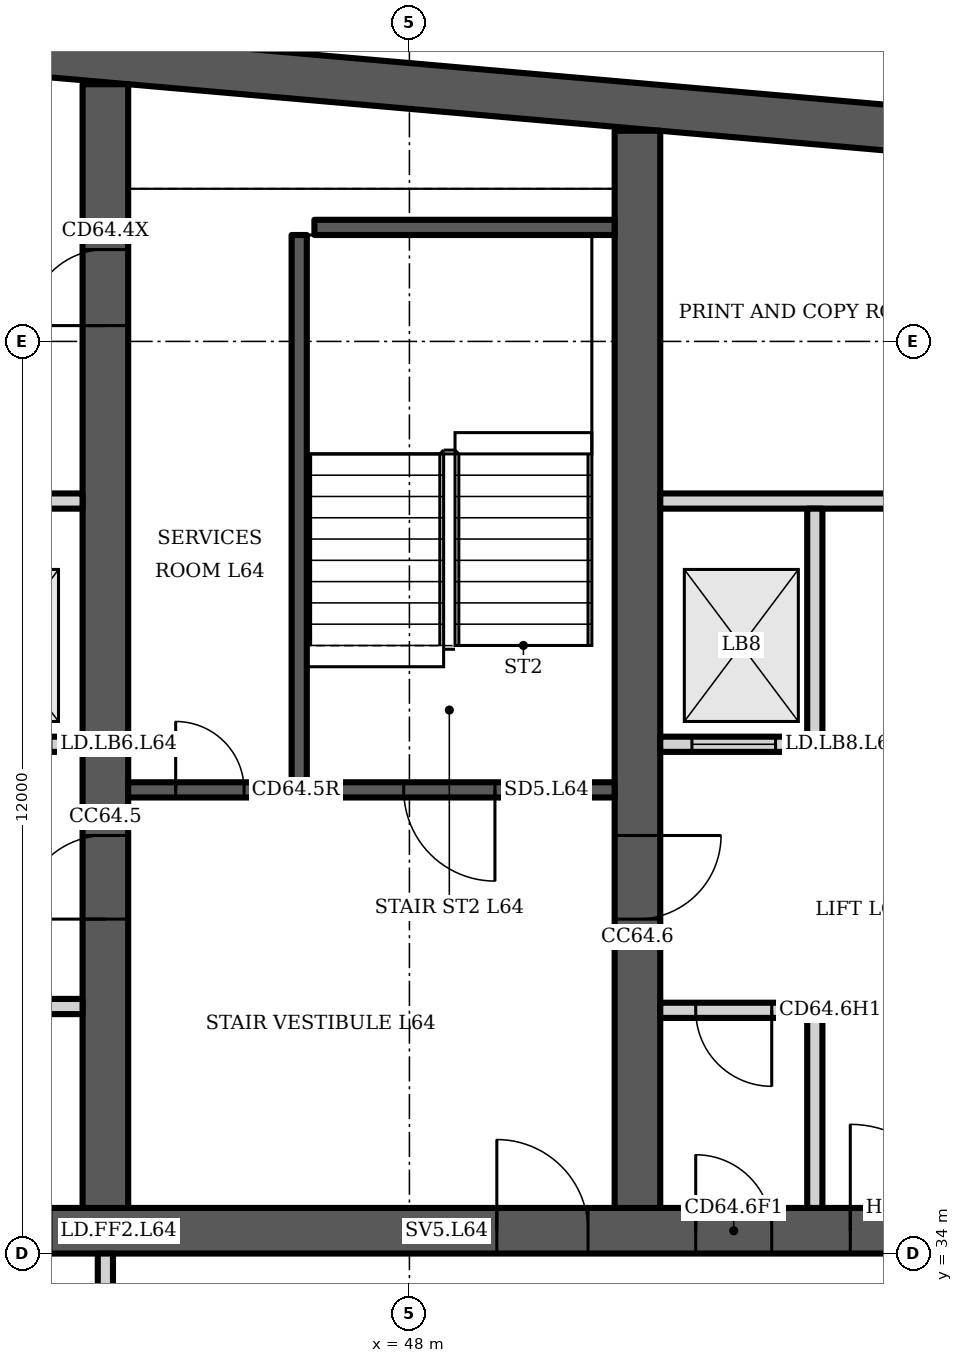
"""IFC4 building model, lengths in metres.
Left out: names, types, materials, properties, quantities, classifications, styles, units other than length and angle.
Written with IfcOpenShell. Run it as: python <this file> out.ifc"""

import sys

from ifc_helpers import new_model, si_unit, direction, frame, frame_2d, origin, place, context, subcontext, project, spatial, polyline, rectangle, outline, extrude, element, fill, save


model = new_model("IFC4")
c1 = context("Model", 3, precision=1e-05, world=origin(), true_north=direction((0.0, 1.0)))
c2 = subcontext(c1, "Body", "Model", "MODEL_VIEW")
j1 = project(units=[si_unit("LENGTHUNIT", "METRE"), si_unit("PLANEANGLEUNIT", "RADIAN")], contexts=[c1])
p1 = place(None, origin())
s1 = spatial("IfcSite", under=j1, at=p1, CompositionType="ELEMENT")
p2 = place(p1, origin())
s2 = spatial("IfcBuilding", under=s1, at=p2, CompositionType="ELEMENT")
p3 = place(p2, frame((0.0, 0.0, 253.9)))
s3 = spatial("IfcBuildingStorey", under=s2, at=p3, CompositionType="ELEMENT", Elevation=253.9)
p4 = place(p3, origin())
e1 = element("IfcWall", 1, at=p4, inside=s3, PredefinedType="SHEAR", context=c2, shape_type="SweptSolid", body=[
    extrude(outline(polyline([(23.0, 48.185), (40.5, 49.716), (58.0, 48.185), (58.0, 48.787), (40.5, 50.318), (23.0, 48.787), (23.0, 48.185)])), origin(), (0.0, 0.0, 1.0), 3.6),
])
p5 = place(p3, frame((23.0, 34.3, 0.0), z_axis=(0.0, 0.0, 1.0), x_axis=(1.0, 0.0, 0.0)))
e2 = element("IfcWall", 2, at=p5, inside=s3, PredefinedType="SHEAR", context=c2, shape_type="SweptSolid", body=[
    extrude(rectangle(XDim=35.0, YDim=0.6, at=frame_2d((17.5, 0.0))), origin(), (0.0, 0.0, 1.0), 3.6),
])
p6 = place(p5, frame((0.65, 0.0, 0.0)))
e3 = element("IfcOpeningElement", 3, at=p6, cuts=e2, PredefinedType="OPENING", context=c2, shape_type="SweptSolid", body=[
    extrude(rectangle(XDim=1.2, YDim=2.1, at=frame_2d((0.6, 1.05))), frame((0.0, 0.31, 0.0), z_axis=(0.0, -1.0, 0.0), x_axis=(1.0, 0.0, 0.0)), (0.0, 0.0, 1.0), 0.62),
])
p7 = place(p5, frame((7.717, 0.0, 0.0)))
e4 = element("IfcOpeningElement", 4, at=p7, cuts=e2, PredefinedType="OPENING", context=c2, shape_type="SweptSolid", body=[
    extrude(rectangle(XDim=1.1, YDim=2.1, at=frame_2d((0.55, 1.05))), frame((0.0, 0.31, 0.0), z_axis=(0.0, -1.0, 0.0), x_axis=(1.0, 0.0, 0.0)), (0.0, 0.0, 1.0), 0.62),
])
p8 = place(p5, frame((12.183, 0.0, 0.0)))
e5 = element("IfcOpeningElement", 5, at=p8, cuts=e2, PredefinedType="OPENING", context=c2, shape_type="SweptSolid", body=[
    extrude(rectangle(XDim=1.1, YDim=2.1, at=frame_2d((0.55, 1.05))), frame((0.0, 0.31, 0.0), z_axis=(0.0, -1.0, 0.0), x_axis=(1.0, 0.0, 0.0)), (0.0, 0.0, 1.0), 0.62),
])
p9 = place(p5, frame((9.8, 0.0, 0.0)))
e6 = element("IfcOpeningElement", 6, at=p9, cuts=e2, PredefinedType="OPENING", context=c2, shape_type="SweptSolid", body=[
    extrude(rectangle(XDim=1.4, YDim=2.1, at=frame_2d((0.7, 1.05))), frame((0.0, 0.31, 0.0), z_axis=(0.0, -1.0, 0.0), x_axis=(1.0, 0.0, 0.0)), (0.0, 0.0, 1.0), 0.62),
])
p10 = place(p5, frame((14.717, 0.0, 0.0)))
e7 = element("IfcOpeningElement", 7, at=p10, cuts=e2, PredefinedType="OPENING", context=c2, shape_type="SweptSolid", body=[
    extrude(rectangle(XDim=1.1, YDim=2.1, at=frame_2d((0.55, 1.05))), frame((0.0, 0.31, 0.0), z_axis=(0.0, -1.0, 0.0), x_axis=(1.0, 0.0, 0.0)), (0.0, 0.0, 1.0), 0.62),
])
p11 = place(p5, frame((16.95, 0.0, 0.0)))
e8 = element("IfcOpeningElement", 8, at=p11, cuts=e2, PredefinedType="OPENING", context=c2, shape_type="SweptSolid", body=[
    extrude(rectangle(XDim=1.1, YDim=2.1, at=frame_2d((0.55, 1.05))), frame((0.0, 0.31, 0.0), z_axis=(0.0, -1.0, 0.0), x_axis=(1.0, 0.0, 0.0)), (0.0, 0.0, 1.0), 0.62),
])
p12 = place(p5, frame((19.183, 0.0, 0.0)))
e9 = element("IfcOpeningElement", 9, at=p12, cuts=e2, PredefinedType="OPENING", context=c2, shape_type="SweptSolid", body=[
    extrude(rectangle(XDim=1.1, YDim=2.1, at=frame_2d((0.55, 1.05))), frame((0.0, 0.31, 0.0), z_axis=(0.0, -1.0, 0.0), x_axis=(1.0, 0.0, 0.0)), (0.0, 0.0, 1.0), 0.62),
])
p13 = place(p5, frame((26.15, 0.0, 0.0)))
e10 = element("IfcOpeningElement", 10, at=p13, cuts=e2, PredefinedType="OPENING", context=c2, shape_type="SweptSolid", body=[
    extrude(rectangle(XDim=1.2, YDim=2.1, at=frame_2d((0.6, 1.05))), frame((0.0, 0.31, 0.0), z_axis=(0.0, -1.0, 0.0), x_axis=(1.0, 0.0, 0.0)), (0.0, 0.0, 1.0), 0.62),
])
p14 = place(p5, frame((28.767, 0.0, 0.0)))
e11 = element("IfcOpeningElement", 11, at=p14, cuts=e2, PredefinedType="OPENING", context=c2, shape_type="SweptSolid", body=[
    extrude(rectangle(XDim=1.0, YDim=2.1, at=frame_2d((0.5, 1.05))), frame((0.0, 0.31, 0.0), z_axis=(0.0, -1.0, 0.0), x_axis=(1.0, 0.0, 0.0)), (0.0, 0.0, 1.0), 0.62),
])
p15 = place(p5, frame((33.083, 0.0, 0.0)))
e12 = element("IfcOpeningElement", 12, at=p15, cuts=e2, PredefinedType="OPENING", context=c2, shape_type="SweptSolid", body=[
    extrude(rectangle(XDim=1.0, YDim=2.1, at=frame_2d((0.5, 1.05))), frame((0.0, 0.31, 0.0), z_axis=(0.0, -1.0, 0.0), x_axis=(1.0, 0.0, 0.0)), (0.0, 0.0, 1.0), 0.62),
])
p16 = place(p5, frame((30.8, 0.0, 0.0)))
e13 = element("IfcOpeningElement", 13, at=p16, cuts=e2, PredefinedType="OPENING", context=c2, shape_type="SweptSolid", body=[
    extrude(rectangle(XDim=1.4, YDim=2.1, at=frame_2d((0.7, 1.05))), frame((0.0, 0.31, 0.0), z_axis=(0.0, -1.0, 0.0), x_axis=(1.0, 0.0, 0.0)), (0.0, 0.0, 1.0), 0.62),
])
p17 = place(p3, frame((44.0, 34.6, 0.0), z_axis=(0.0, 0.0, 1.0), x_axis=(0.0, 1.0, 0.0)))
e14 = element("IfcWall", 14, at=p17, inside=s3, PredefinedType="SHEAR", context=c2, shape_type="SweptSolid", body=[
    extrude(rectangle(XDim=14.784, YDim=0.6, at=frame_2d((7.392, 0.0))), origin(), (0.0, 0.0, 1.0), 3.6),
])
p18 = place(p17, frame((11.608, 0.0, 0.0)))
e15 = element("IfcOpeningElement", 15, at=p18, cuts=e14, PredefinedType="OPENING", context=c2, shape_type="SweptSolid", body=[
    extrude(rectangle(XDim=1.0, YDim=2.1, at=frame_2d((0.5, 1.05))), frame((0.0, 0.31, 0.0), z_axis=(0.0, -1.0, 0.0), x_axis=(1.0, 0.0, 0.0)), (0.0, 0.0, 1.0), 0.62),
])
p19 = place(p17, frame((3.8, 0.0, 0.0)))
e16 = element("IfcOpeningElement", 16, at=p19, cuts=e14, PredefinedType="OPENING", context=c2, shape_type="SweptSolid", body=[
    extrude(rectangle(XDim=1.1, YDim=2.1, at=frame_2d((0.55, 1.05))), frame((0.0, 0.31, 0.0), z_axis=(0.0, -1.0, 0.0), x_axis=(1.0, 0.0, 0.0)), (0.0, 0.0, 1.0), 0.62),
])
p20 = place(p3, frame((51.0, 34.6, 0.0), z_axis=(0.0, 0.0, 1.0), x_axis=(0.0, 1.0, 0.0)))
e17 = element("IfcWall", 17, at=p20, inside=s3, PredefinedType="SHEAR", context=c2, shape_type="SweptSolid", body=[
    extrude(rectangle(XDim=14.171, YDim=0.6, at=frame_2d((7.085, 0.0))), origin(), (0.0, 0.0, 1.0), 3.6),
])
p21 = place(p20, frame((3.8, 0.0, 0.0)))
e18 = element("IfcOpeningElement", 18, at=p21, cuts=e17, PredefinedType="OPENING", context=c2, shape_type="SweptSolid", body=[
    extrude(rectangle(XDim=1.1, YDim=2.1, at=frame_2d((0.55, 1.05))), frame((0.0, 0.31, 0.0), z_axis=(0.0, -1.0, 0.0), x_axis=(1.0, 0.0, 0.0)), (0.0, 0.0, 1.0), 0.62),
])
p22 = place(p3, frame((37.3, 40.7, 0.0), z_axis=(0.0, 0.0, 1.0), x_axis=(1.0, 0.0, 0.0)))
e19 = element("IfcWall", 19, at=p22, inside=s3, PredefinedType="PARTITIONING", context=c2, shape_type="SweptSolid", body=[
    extrude(rectangle(XDim=6.4, YDim=0.2, at=frame_2d((3.2, 0.0))), origin(), (0.0, 0.0, 1.0), 3.2),
])
p23 = place(p22, frame((0.417, 0.0, 0.0)))
e20 = element("IfcOpeningElement", 20, at=p23, cuts=e19, PredefinedType="OPENING", context=c2, shape_type="SweptSolid", body=[
    extrude(rectangle(XDim=1.1, YDim=2.1, at=frame_2d((0.55, 1.05))), frame((0.0, 0.11, 0.0), z_axis=(0.0, -1.0, 0.0), x_axis=(1.0, 0.0, 0.0)), (0.0, 0.0, 1.0), 0.22),
])
p24 = place(p22, frame((2.65, 0.0, 0.0)))
e21 = element("IfcOpeningElement", 21, at=p24, cuts=e19, PredefinedType="OPENING", context=c2, shape_type="SweptSolid", body=[
    extrude(rectangle(XDim=1.1, YDim=2.1, at=frame_2d((0.55, 1.05))), frame((0.0, 0.11, 0.0), z_axis=(0.0, -1.0, 0.0), x_axis=(1.0, 0.0, 0.0)), (0.0, 0.0, 1.0), 0.22),
])
p25 = place(p22, frame((4.883, 0.0, 0.0)))
e22 = element("IfcOpeningElement", 22, at=p25, cuts=e19, PredefinedType="OPENING", context=c2, shape_type="SweptSolid", body=[
    extrude(rectangle(XDim=1.1, YDim=2.1, at=frame_2d((0.55, 1.05))), frame((0.0, 0.11, 0.0), z_axis=(0.0, -1.0, 0.0), x_axis=(1.0, 0.0, 0.0)), (0.0, 0.0, 1.0), 0.22),
])
p26 = place(p3, origin())
e23 = element("IfcWall", 23, at=p26, inside=s3, PredefinedType="PARTITIONING", context=c2, shape_type="SweptSolid", body=[
    extrude(outline(polyline([(41.567, 37.1), (39.433, 37.1), (39.433, 34.6), (39.233, 34.6), (39.233, 37.45), (37.3, 37.45), (37.3, 37.65), (39.233, 37.65), (39.433, 37.65), (39.433, 37.3), (41.567, 37.3), (41.567, 37.35), (41.767, 37.35), (43.7, 37.35), (43.7, 37.15), (41.767, 37.15), (41.767, 34.6), (41.567, 34.6), (41.567, 37.1)])), origin(), (0.0, 0.0, 1.0), 3.2),
])
p27 = place(p3, origin())
e24 = element("IfcWall", 24, at=p27, inside=s3, PredefinedType="PARTITIONING", context=c2, shape_type="SweptSolid", body=[
    extrude(outline(polyline([(39.433, 40.8), (39.233, 40.8), (39.233, 43.8), (37.3, 43.8), (37.3, 44.0), (43.7, 44.0), (43.7, 43.8), (41.767, 43.8), (41.767, 40.8), (41.567, 40.8), (41.567, 43.8), (39.433, 43.8), (39.433, 40.8)])), origin(), (0.0, 0.0, 1.0), 3.2),
])
p28 = place(p3, frame((44.3, 40.1, 0.0), z_axis=(0.0, 0.0, 1.0), x_axis=(1.0, 0.0, 0.0)))
e25 = element("IfcWall", 25, at=p28, inside=s3, PredefinedType="SHEAR", context=c2, shape_type="SweptSolid", body=[
    extrude(rectangle(XDim=6.4, YDim=0.2, at=frame_2d((3.2, 0.0))), origin(), (0.0, 0.0, 1.0), 3.2),
])
p29 = place(p28, frame((3.625, 0.0, 0.0)))
e26 = element("IfcOpeningElement", 26, at=p29, cuts=e25, PredefinedType="OPENING", context=c2, shape_type="SweptSolid", body=[
    extrude(rectangle(XDim=1.2, YDim=2.1, at=frame_2d((0.6, 1.05))), frame((0.0, 0.11, 0.0), z_axis=(0.0, -1.0, 0.0), x_axis=(1.0, 0.0, 0.0)), (0.0, 0.0, 1.0), 0.22),
])
p30 = place(p28, frame((0.625, 0.0, 0.0)))
e27 = element("IfcOpeningElement", 27, at=p30, cuts=e25, PredefinedType="OPENING", context=c2, shape_type="SweptSolid", body=[
    extrude(rectangle(XDim=0.9, YDim=2.1, at=frame_2d((0.45, 1.05))), frame((0.0, 0.11, 0.0), z_axis=(0.0, -1.0, 0.0), x_axis=(1.0, 0.0, 0.0)), (0.0, 0.0, 1.0), 0.22),
])
p31 = place(p3, frame((46.55, 40.2, 0.0), z_axis=(0.0, 0.0, 1.0), x_axis=(0.0, 1.0, 0.0)))
e28 = element("IfcWall", 28, at=p31, inside=s3, PredefinedType="SHEAR", context=c2, shape_type="SweptSolid", body=[
    extrude(rectangle(XDim=7.2, YDim=0.2, at=frame_2d((3.6, 0.0))), origin(), (0.0, 0.0, 1.0), 3.2),
])
p32 = place(p3, frame((46.75, 47.5, 0.0), z_axis=(0.0, 0.0, 1.0), x_axis=(1.0, 0.0, 0.0)))
e29 = element("IfcWall", 29, at=p32, inside=s3, PredefinedType="SHEAR", context=c2, shape_type="SweptSolid", body=[
    extrude(rectangle(XDim=3.95, YDim=0.2, at=frame_2d((1.975, 0.0))), origin(), (0.0, 0.0, 1.0), 3.2),
])
p33 = place(p3, frame((51.3, 37.2, 0.0), z_axis=(0.0, 0.0, 1.0), x_axis=(1.0, 0.0, 0.0)))
e30 = element("IfcWall", 30, at=p33, inside=s3, PredefinedType="PARTITIONING", context=c2, shape_type="SweptSolid", body=[
    extrude(rectangle(XDim=1.933, YDim=0.2, at=frame_2d((0.967, 0.0))), origin(), (0.0, 0.0, 1.0), 3.2),
])
p34 = place(p33, frame((0.467, 0.0, 0.0)))
e31 = element("IfcOpeningElement", 31, at=p34, cuts=e30, PredefinedType="OPENING", context=c2, shape_type="SweptSolid", body=[
    extrude(rectangle(XDim=1.0, YDim=2.1, at=frame_2d((0.5, 1.05))), frame((0.0, 0.11, 0.0), z_axis=(0.0, -1.0, 0.0), x_axis=(1.0, 0.0, 0.0)), (0.0, 0.0, 1.0), 0.22),
])
p35 = place(p3, frame((51.3, 40.7, 0.0), z_axis=(0.0, 0.0, 1.0), x_axis=(1.0, 0.0, 0.0)))
e32 = element("IfcWall", 32, at=p35, inside=s3, PredefinedType="PARTITIONING", context=c2, shape_type="SweptSolid", body=[
    extrude(rectangle(XDim=6.1, YDim=0.2, at=frame_2d((3.05, 0.0))), origin(), (0.0, 0.0, 1.0), 3.2),
])
p36 = place(p35, frame((0.417, 0.0, 0.0)))
e33 = element("IfcOpeningElement", 33, at=p36, cuts=e32, PredefinedType="OPENING", context=c2, shape_type="SweptSolid", body=[
    extrude(rectangle(XDim=1.1, YDim=2.1, at=frame_2d((0.55, 1.05))), frame((0.0, 0.11, 0.0), z_axis=(0.0, -1.0, 0.0), x_axis=(1.0, 0.0, 0.0)), (0.0, 0.0, 1.0), 0.22),
])
p37 = place(p35, frame((3.617, 0.0, 0.0)))
e34 = element("IfcOpeningElement", 34, at=p37, cuts=e32, PredefinedType="OPENING", context=c2, shape_type="SweptSolid", body=[
    extrude(rectangle(XDim=1.0, YDim=2.1, at=frame_2d((0.5, 1.05))), frame((0.0, 0.11, 0.0), z_axis=(0.0, -1.0, 0.0), x_axis=(1.0, 0.0, 0.0)), (0.0, 0.0, 1.0), 0.22),
])
p38 = place(p3, frame((51.3, 43.9, 0.0), z_axis=(0.0, 0.0, 1.0), x_axis=(1.0, 0.0, 0.0)))
e35 = element("IfcWall", 35, at=p38, inside=s3, PredefinedType="PARTITIONING", context=c2, shape_type="SweptSolid", body=[
    extrude(rectangle(XDim=6.1, YDim=0.2, at=frame_2d((3.05, 0.0))), origin(), (0.0, 0.0, 1.0), 3.2),
])
p39 = place(p38, frame((3.617, 0.0, 0.0)))
e36 = element("IfcOpeningElement", 36, at=p39, cuts=e35, PredefinedType="OPENING", context=c2, shape_type="SweptSolid", body=[
    extrude(rectangle(XDim=1.0, YDim=2.1, at=frame_2d((0.5, 1.05))), frame((0.0, 0.11, 0.0), z_axis=(0.0, -1.0, 0.0), x_axis=(1.0, 0.0, 0.0)), (0.0, 0.0, 1.0), 0.22),
])
p40 = place(p3, origin())
e37 = element("IfcWall", 37, at=p40, inside=s3, PredefinedType="PARTITIONING", context=c2, shape_type="SweptSolid", body=[
    extrude(outline(polyline([(53.233, 34.6), (53.233, 37.3), (53.433, 37.3), (53.433, 34.6), (53.233, 34.6)])), origin(), (0.0, 0.0, 1.0), 3.2),
])
p41 = place(p3, origin())
e38 = element("IfcWall", 38, at=p41, inside=s3, PredefinedType="PARTITIONING", context=c2, shape_type="SweptSolid", body=[
    extrude(outline(polyline([(53.433, 40.8), (53.433, 43.8), (53.233, 43.8), (53.233, 40.8), (53.433, 40.8)])), origin(), (0.0, 0.0, 1.0), 3.2),
])
p42 = place(p3, frame((44.0, 30.5, 0.0), z_axis=(0.0, 0.0, 1.0), x_axis=(0.0, 1.0, 0.0)))
e39 = element("IfcWall", 39, at=p42, inside=s3, PredefinedType="PARTITIONING", context=c2, shape_type="SweptSolid", body=[
    extrude(rectangle(XDim=3.5, YDim=0.2, at=frame_2d((1.75, 0.0))), origin(), (0.0, 0.0, 1.0), 3.2),
])
p43 = place(p42, frame((1.2, 0.0, 0.0)))
e40 = element("IfcOpeningElement", 40, at=p43, cuts=e39, PredefinedType="OPENING", context=c2, shape_type="SweptSolid", body=[
    extrude(rectangle(XDim=1.1, YDim=2.1, at=frame_2d((0.55, 1.05))), frame((0.0, 0.11, 0.0), z_axis=(0.0, -1.0, 0.0), x_axis=(1.0, 0.0, 0.0)), (0.0, 0.0, 1.0), 0.22),
])
p44 = place(p18, origin())
e41 = element("IfcDoor", 41, at=p44, inside=s3, OperationType="SINGLE_SWING_LEFT", PredefinedType="DOOR", context=c2, shape_type="SweptSolid", body=[
    extrude(rectangle(XDim=1.0, YDim=2.1, at=frame_2d((0.5, 1.05))), frame((0.0, 0.025, 0.0), z_axis=(0.0, -1.0, 0.0), x_axis=(1.0, 0.0, 0.0)), (0.0, 0.0, 1.0), 0.05),
])
fill(e15, e41)
p45 = place(p29, origin())
e42 = element("IfcDoor", 42, at=p45, inside=s3, OperationType="SINGLE_SWING_RIGHT", PredefinedType="DOOR", context=c2, shape_type="SweptSolid", body=[
    extrude(rectangle(XDim=1.2, YDim=2.1, at=frame_2d((0.6, 1.05))), frame((0.0, 0.025, 0.0), z_axis=(0.0, -1.0, 0.0), x_axis=(1.0, 0.0, 0.0)), (0.0, 0.0, 1.0), 0.05),
])
fill(e26, e42)
p46 = place(p30, origin())
e43 = element("IfcDoor", 43, at=p46, inside=s3, OperationType="SINGLE_SWING_LEFT", PredefinedType="DOOR", context=c2, shape_type="SweptSolid", body=[
    extrude(rectangle(XDim=0.9, YDim=2.1, at=frame_2d((0.45, 1.05))), frame((0.0, 0.025, 0.0), z_axis=(0.0, -1.0, 0.0), x_axis=(1.0, 0.0, 0.0)), (0.0, 0.0, 1.0), 0.05),
])
fill(e27, e43)
p47 = place(p13, origin())
e44 = element("IfcDoor", 44, at=p47, inside=s3, OperationType="SINGLE_SWING_LEFT", PredefinedType="DOOR", context=c2, shape_type="SweptSolid", body=[
    extrude(rectangle(XDim=1.2, YDim=2.1, at=frame_2d((0.6, 1.05))), frame((0.0, 0.025, 0.0), z_axis=(0.0, -1.0, 0.0), x_axis=(1.0, 0.0, 0.0)), (0.0, 0.0, 1.0), 0.05),
])
fill(e10, e44)
p48 = place(p14, origin())
e45 = element("IfcDoor", 45, at=p48, inside=s3, OperationType="SINGLE_SWING_LEFT", PredefinedType="DOOR", context=c2, shape_type="SweptSolid", body=[
    extrude(rectangle(XDim=1.0, YDim=2.1, at=frame_2d((0.5, 1.05))), frame((0.0, 0.025, 0.0), z_axis=(0.0, -1.0, 0.0), x_axis=(1.0, 0.0, 0.0)), (0.0, 0.0, 1.0), 0.05),
])
fill(e11, e45)
p49 = place(p34, origin())
e46 = element("IfcDoor", 46, at=p49, inside=s3, OperationType="SINGLE_SWING_RIGHT", PredefinedType="DOOR", context=c2, shape_type="SweptSolid", body=[
    extrude(rectangle(XDim=1.0, YDim=2.1, at=frame_2d((0.5, 1.05))), frame((0.0, 0.025, 0.0), z_axis=(0.0, -1.0, 0.0), x_axis=(1.0, 0.0, 0.0)), (0.0, 0.0, 1.0), 0.05),
])
fill(e31, e46)
p50 = place(p16, origin())
e47 = element("IfcDoor", 47, at=p50, inside=s3, OperationType="DOUBLE_DOOR_SINGLE_SWING", PredefinedType="DOOR", context=c2, shape_type="SweptSolid", body=[
    extrude(rectangle(XDim=1.4, YDim=2.1, at=frame_2d((0.7, 1.05))), frame((0.0, 0.025, 0.0), z_axis=(0.0, -1.0, 0.0), x_axis=(1.0, 0.0, 0.0)), (0.0, 0.0, 1.0), 0.05),
])
fill(e13, e47)
p51 = place(p36, origin())
e48 = element("IfcDoor", 48, at=p51, inside=s3, OperationType="DOUBLE_DOOR_SLIDING", PredefinedType="DOOR", context=c2, shape_type="SweptSolid", body=[
    extrude(rectangle(XDim=1.1, YDim=2.1, at=frame_2d((0.55, 1.05))), frame((0.0, 0.025, 0.0), z_axis=(0.0, -1.0, 0.0), x_axis=(1.0, 0.0, 0.0)), (0.0, 0.0, 1.0), 0.05),
])
fill(e33, e48)
p52 = place(p19, origin())
e49 = element("IfcDoor", 49, at=p52, inside=s3, OperationType="SINGLE_SWING_LEFT", PredefinedType="DOOR", context=c2, shape_type="SweptSolid", body=[
    extrude(rectangle(XDim=1.1, YDim=2.1, at=frame_2d((0.55, 1.05))), frame((0.0, 0.025, 0.0), z_axis=(0.0, -1.0, 0.0), x_axis=(1.0, 0.0, 0.0)), (0.0, 0.0, 1.0), 0.05),
])
fill(e16, e49)
p53 = place(p21, origin())
e50 = element("IfcDoor", 50, at=p53, inside=s3, OperationType="SINGLE_SWING_RIGHT", PredefinedType="DOOR", context=c2, shape_type="SweptSolid", body=[
    extrude(rectangle(XDim=1.1, YDim=2.1, at=frame_2d((0.55, 1.05))), frame((0.0, 0.025, 0.0), z_axis=(0.0, -1.0, 0.0), x_axis=(1.0, 0.0, 0.0)), (0.0, 0.0, 1.0), 0.05),
])
fill(e18, e50)
save(model, sys.argv[1])
